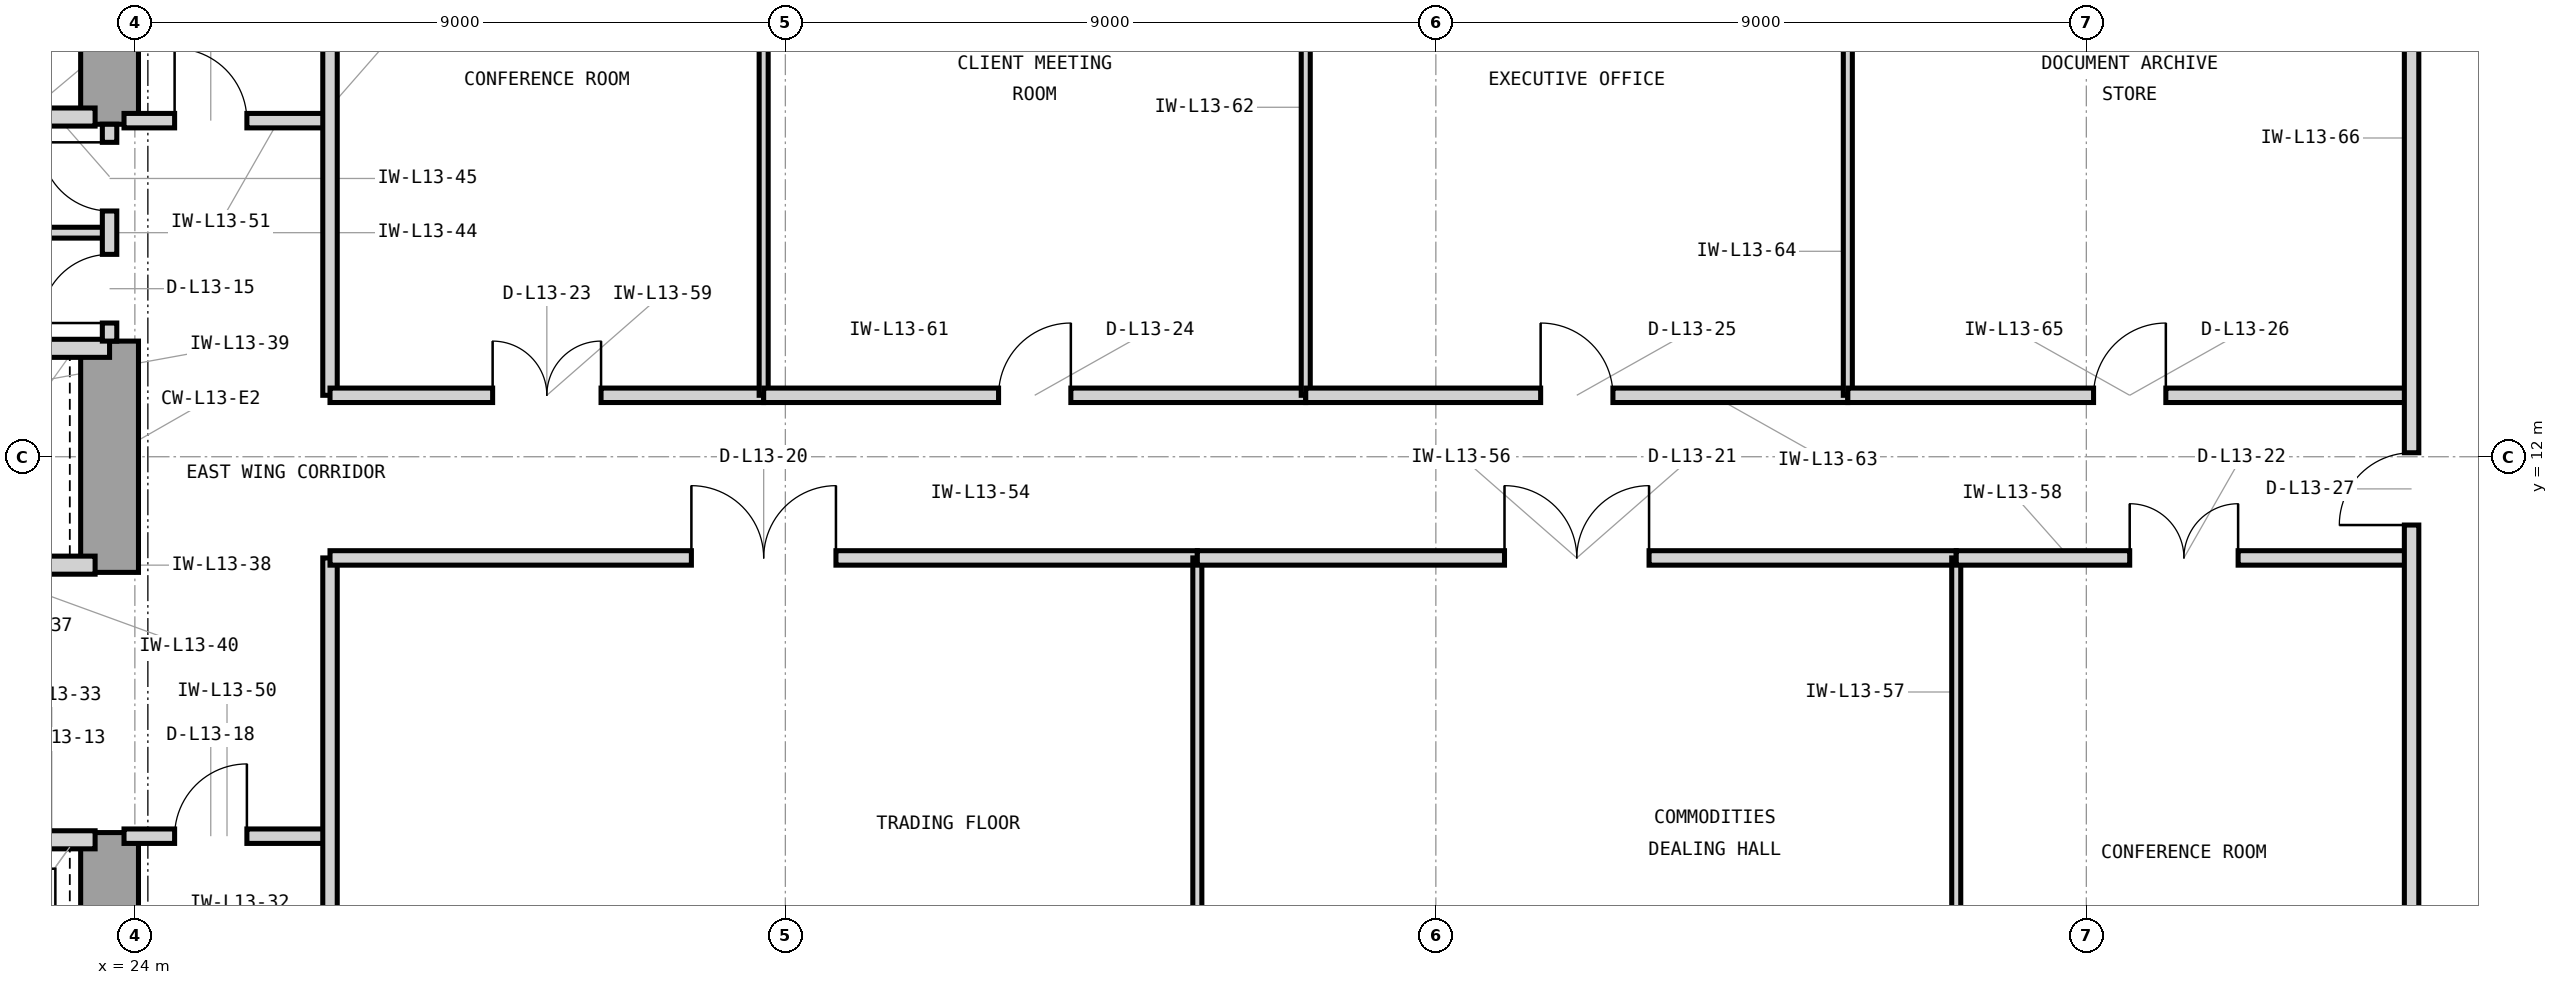
"""IFC4 building model, lengths in metres.
Left out: names, types, materials, properties, quantities, classifications, styles, units other than length and angle.
Written with IfcOpenShell. Run it as: python <this file> out.ifc"""

import sys

from ifc_helpers import new_model, si_unit, direction, frame, frame_2d, origin, place, context, subcontext, project, spatial, rectangle, extrude, element, fill, save


model = new_model("IFC4")
c1 = context("Model", 3, precision=1e-05, world=origin(), true_north=direction((0.0, 1.0)))
c2 = subcontext(c1, "Body", "Model", "MODEL_VIEW")
j1 = project(units=[si_unit("LENGTHUNIT", "METRE"), si_unit("PLANEANGLEUNIT", "RADIAN")], contexts=[c1])
p1 = place(None, origin())
s1 = spatial("IfcSite", under=j1, at=p1, CompositionType="ELEMENT")
p2 = place(p1, origin())
s2 = spatial("IfcBuilding", under=s1, at=p2, CompositionType="ELEMENT")
p3 = place(p2, frame((0.0, 0.0, 59.4)))
s3 = spatial("IfcBuildingStorey", under=s2, at=p3, CompositionType="ELEMENT", Elevation=59.4)
p4 = place(p3, frame((23.65, 3.75, 0.0), z_axis=(0.0, 0.0, 1.0), x_axis=(0.0, 1.0, 0.0)))
e1 = element("IfcWall", 1, at=p4, inside=s3, PredefinedType="SHEAR", context=c2, shape_type="SweptSolid", body=[
    extrude(rectangle(XDim=3.05, YDim=0.8, at=frame_2d((1.525, 0.0))), origin(), (0.0, 0.0, 1.0), 4.2),
])
p5 = place(p3, frame((23.65, 10.4, 0.0), z_axis=(0.0, 0.0, 1.0), x_axis=(0.0, 1.0, 0.0)))
e2 = element("IfcWall", 2, at=p5, inside=s3, PredefinedType="SHEAR", context=c2, shape_type="SweptSolid", body=[
    extrude(rectangle(XDim=3.2, YDim=0.8, at=frame_2d((1.6, 0.0))), origin(), (0.0, 0.0, 1.0), 4.2),
])
p6 = place(p3, frame((23.65, 16.6, 0.0), z_axis=(0.0, 0.0, 1.0), x_axis=(0.0, 1.0, 0.0)))
e3 = element("IfcWall", 3, at=p6, inside=s3, PredefinedType="SHEAR", context=c2, shape_type="SweptSolid", body=[
    extrude(rectangle(XDim=4.05, YDim=0.8, at=frame_2d((2.025, 0.0))), origin(), (0.0, 0.0, 1.0), 4.2),
])
p7 = place(p3, frame((21.05, 16.7, 0.0), z_axis=(0.0, 0.0, 1.0), x_axis=(1.0, 0.0, 0.0)))
e4 = element("IfcWall", 4, at=p7, inside=s3, PredefinedType="PARTITIONING", context=c2, shape_type="SweptSolid", body=[
    extrude(rectangle(XDim=2.4, YDim=0.25, at=frame_2d((1.2, 0.0))), origin(), (0.0, 0.0, 1.0), 3.426),
])
p8 = place(p3, frame((21.05, 6.7, 0.0), z_axis=(0.0, 0.0, 1.0), x_axis=(1.0, 0.0, 0.0)))
e5 = element("IfcWall", 5, at=p8, inside=s3, PredefinedType="PARTITIONING", context=c2, shape_type="SweptSolid", body=[
    extrude(rectangle(XDim=2.4, YDim=0.25, at=frame_2d((1.2, 0.0))), origin(), (0.0, 0.0, 1.0), 3.426),
])
p9 = place(p8, frame((0.48, 0.0, 0.0)))
e6 = element("IfcOpeningElement", 6, at=p9, cuts=e5, PredefinedType="OPENING", context=c2, shape_type="SweptSolid", body=[
    extrude(rectangle(XDim=1.15, YDim=2.25, at=frame_2d((0.575, 1.125))), frame((0.0, 0.135, 0.0), z_axis=(0.0, -1.0, 0.0), x_axis=(1.0, 0.0, 0.0)), (0.0, 0.0, 1.0), 0.27),
])
p10 = place(p3, frame((21.05, 10.5, 0.0), z_axis=(0.0, 0.0, 1.0), x_axis=(1.0, 0.0, 0.0)))
e7 = element("IfcWall", 7, at=p10, inside=s3, PredefinedType="PARTITIONING", context=c2, shape_type="SweptSolid", body=[
    extrude(rectangle(XDim=2.4, YDim=0.25, at=frame_2d((1.2, 0.0))), origin(), (0.0, 0.0, 1.0), 3.426),
])
p11 = place(p3, frame((14.7, 13.5, 0.0), z_axis=(0.0, 0.0, 1.0), x_axis=(1.0, 0.0, 0.0)))
e8 = element("IfcWall", 8, at=p11, inside=s3, PredefinedType="PARTITIONING", context=c2, shape_type="SweptSolid", body=[
    extrude(rectangle(XDim=8.95, YDim=0.25, at=frame_2d((4.475, 0.0))), origin(), (0.0, 0.0, 1.0), 3.426),
])
p12 = place(p3, frame((19.65, 15.1, 0.0), z_axis=(0.0, 0.0, 1.0), x_axis=(1.0, 0.0, 0.0)))
e9 = element("IfcWall", 9, at=p12, inside=s3, PredefinedType="PARTITIONING", context=c2, shape_type="SweptSolid", body=[
    extrude(rectangle(XDim=4.0, YDim=0.15, at=frame_2d((2.0, 0.0))), origin(), (0.0, 0.0, 1.0), 3.97),
])
p13 = place(p3, frame((23.65, 13.6, 0.0), z_axis=(0.0, 0.0, 1.0), x_axis=(0.0, 1.0, 0.0)))
e10 = element("IfcWall", 10, at=p13, inside=s3, PredefinedType="PARTITIONING", context=c2, shape_type="SweptSolid", body=[
    extrude(rectangle(XDim=3.0, YDim=0.2, at=frame_2d((1.5, 0.0))), origin(), (0.0, 0.0, 1.0), 3.97),
])
p14 = place(p13, frame((0.25, 0.0, 0.0)))
e11 = element("IfcOpeningElement", 11, at=p14, cuts=e10, PredefinedType="OPENING", context=c2, shape_type="SweptSolid", body=[
    extrude(rectangle(XDim=0.95, YDim=2.1, at=frame_2d((0.475, 1.05))), frame((0.0, 0.11, 0.0), z_axis=(0.0, -1.0, 0.0), x_axis=(1.0, 0.0, 0.0)), (0.0, 0.0, 1.0), 0.22),
])
p15 = place(p13, frame((1.8, 0.0, 0.0)))
e12 = element("IfcOpeningElement", 12, at=p15, cuts=e10, PredefinedType="OPENING", context=c2, shape_type="SweptSolid", body=[
    extrude(rectangle(XDim=0.95, YDim=2.1, at=frame_2d((0.475, 1.05))), frame((0.0, 0.11, 0.0), z_axis=(0.0, -1.0, 0.0), x_axis=(1.0, 0.0, 0.0)), (0.0, 0.0, 1.0), 0.22),
])
p16 = place(p3, frame((23.85, 6.75, 0.0), z_axis=(0.0, 0.0, 1.0), x_axis=(1.0, 0.0, 0.0)))
e13 = element("IfcWall", 13, at=p16, inside=s3, PredefinedType="PARTITIONING", context=c2, shape_type="SweptSolid", body=[
    extrude(rectangle(XDim=2.85, YDim=0.2, at=frame_2d((1.425, 0.0))), origin(), (0.0, 0.0, 1.0), 3.97),
])
p17 = place(p16, frame((0.7, 0.0, 0.0)))
e14 = element("IfcOpeningElement", 14, at=p17, cuts=e13, PredefinedType="OPENING", context=c2, shape_type="SweptSolid", body=[
    extrude(rectangle(XDim=1.0, YDim=2.15, at=frame_2d((0.5, 1.075))), frame((0.0, 0.11, 0.0), z_axis=(0.0, -1.0, 0.0), x_axis=(1.0, 0.0, 0.0)), (0.0, 0.0, 1.0), 0.22),
])
p18 = place(p3, frame((23.85, 16.65, 0.0), z_axis=(0.0, 0.0, 1.0), x_axis=(1.0, 0.0, 0.0)))
e15 = element("IfcWall", 15, at=p18, inside=s3, PredefinedType="PARTITIONING", context=c2, shape_type="SweptSolid", body=[
    extrude(rectangle(XDim=2.85, YDim=0.2, at=frame_2d((1.425, 0.0))), origin(), (0.0, 0.0, 1.0), 3.97),
])
p19 = place(p18, frame((0.7, 0.0, 0.0)))
e16 = element("IfcOpeningElement", 16, at=p19, cuts=e15, PredefinedType="OPENING", context=c2, shape_type="SweptSolid", body=[
    extrude(rectangle(XDim=1.0, YDim=2.15, at=frame_2d((0.5, 1.075))), frame((0.0, 0.11, 0.0), z_axis=(0.0, -1.0, 0.0), x_axis=(1.0, 0.0, 0.0)), (0.0, 0.0, 1.0), 0.22),
])
p20 = place(p3, frame((26.7, 3.18, 0.0), z_axis=(0.0, 0.0, 1.0), x_axis=(0.0, 1.0, 0.0)))
e17 = element("IfcWall", 17, at=p20, inside=s3, PredefinedType="PARTITIONING", context=c2, shape_type="SweptSolid", body=[
    extrude(rectangle(XDim=7.42, YDim=0.2, at=frame_2d((3.71, 0.0))), origin(), (0.0, 0.0, 1.0), 3.97),
])
p21 = place(p3, frame((26.7, 12.85, 0.0), z_axis=(0.0, 0.0, 1.0), x_axis=(0.0, 1.0, 0.0)))
e18 = element("IfcWall", 18, at=p21, inside=s3, PredefinedType="PARTITIONING", context=c2, shape_type="SweptSolid", body=[
    extrude(rectangle(XDim=7.97, YDim=0.2, at=frame_2d((3.985, 0.0))), origin(), (0.0, 0.0, 1.0), 3.97),
])
p22 = place(p3, frame((26.7, 10.6, 0.0), z_axis=(0.0, 0.0, 1.0), x_axis=(1.0, 0.0, 0.0)))
e19 = element("IfcWall", 19, at=p22, inside=s3, PredefinedType="PARTITIONING", context=c2, shape_type="SweptSolid", body=[
    extrude(rectangle(XDim=12.0, YDim=0.2, at=frame_2d((6.0, 0.0))), origin(), (0.0, 0.0, 1.0), 3.97),
])
p23 = place(p22, frame((5.0, 0.0, 0.0)))
e20 = element("IfcOpeningElement", 20, at=p23, cuts=e19, PredefinedType="OPENING", context=c2, shape_type="SweptSolid", body=[
    extrude(rectangle(XDim=2.0, YDim=2.5, at=frame_2d((1.0, 1.25))), frame((0.0, 0.11, 0.0), z_axis=(0.0, -1.0, 0.0), x_axis=(1.0, 0.0, 0.0)), (0.0, 0.0, 1.0), 0.22),
])
p24 = place(p3, frame((38.7, 3.18, 0.0), z_axis=(0.0, 0.0, 1.0), x_axis=(0.0, 1.0, 0.0)))
e21 = element("IfcWall", 21, at=p24, inside=s3, PredefinedType="PARTITIONING", context=c2, shape_type="SweptSolid", body=[
    extrude(rectangle(XDim=7.42, YDim=0.125, at=frame_2d((3.71, 0.0))), origin(), (0.0, 0.0, 1.0), 3.97),
])
p25 = place(p3, frame((38.7, 10.6, 0.0), z_axis=(0.0, 0.0, 1.0), x_axis=(1.0, 0.0, 0.0)))
e22 = element("IfcWall", 22, at=p25, inside=s3, PredefinedType="PARTITIONING", context=c2, shape_type="SweptSolid", body=[
    extrude(rectangle(XDim=10.5, YDim=0.2, at=frame_2d((5.25, 0.0))), origin(), (0.0, 0.0, 1.0), 3.97),
])
p26 = place(p25, frame((4.25, 0.0, 0.0)))
e23 = element("IfcOpeningElement", 23, at=p26, cuts=e22, PredefinedType="OPENING", context=c2, shape_type="SweptSolid", body=[
    extrude(rectangle(XDim=2.0, YDim=2.5, at=frame_2d((1.0, 1.25))), frame((0.0, 0.11, 0.0), z_axis=(0.0, -1.0, 0.0), x_axis=(1.0, 0.0, 0.0)), (0.0, 0.0, 1.0), 0.22),
])
p27 = place(p3, frame((49.2, 3.18, 0.0), z_axis=(0.0, 0.0, 1.0), x_axis=(0.0, 1.0, 0.0)))
e24 = element("IfcWall", 24, at=p27, inside=s3, PredefinedType="PARTITIONING", context=c2, shape_type="SweptSolid", body=[
    extrude(rectangle(XDim=7.42, YDim=0.125, at=frame_2d((3.71, 0.0))), origin(), (0.0, 0.0, 1.0), 3.97),
])
p28 = place(p3, frame((49.2, 10.6, 0.0), z_axis=(0.0, 0.0, 1.0), x_axis=(1.0, 0.0, 0.0)))
e25 = element("IfcWall", 25, at=p28, inside=s3, PredefinedType="PARTITIONING", context=c2, shape_type="SweptSolid", body=[
    extrude(rectangle(XDim=6.3, YDim=0.2, at=frame_2d((3.15, 0.0))), origin(), (0.0, 0.0, 1.0), 3.97),
])
p29 = place(p28, frame((2.4, 0.0, 0.0)))
e26 = element("IfcOpeningElement", 26, at=p29, cuts=e25, PredefinedType="OPENING", context=c2, shape_type="SweptSolid", body=[
    extrude(rectangle(XDim=1.5, YDim=2.3, at=frame_2d((0.75, 1.15))), frame((0.0, 0.11, 0.0), z_axis=(0.0, -1.0, 0.0), x_axis=(1.0, 0.0, 0.0)), (0.0, 0.0, 1.0), 0.22),
])
p30 = place(p3, frame((26.7, 12.85, 0.0), z_axis=(0.0, 0.0, 1.0), x_axis=(1.0, 0.0, 0.0)))
e27 = element("IfcWall", 27, at=p30, inside=s3, PredefinedType="PARTITIONING", context=c2, shape_type="SweptSolid", body=[
    extrude(rectangle(XDim=6.0, YDim=0.2, at=frame_2d((3.0, 0.0))), origin(), (0.0, 0.0, 1.0), 3.97),
])
p31 = place(p30, frame((2.25, 0.0, 0.0)))
e28 = element("IfcOpeningElement", 28, at=p31, cuts=e27, PredefinedType="OPENING", context=c2, shape_type="SweptSolid", body=[
    extrude(rectangle(XDim=1.5, YDim=2.3, at=frame_2d((0.75, 1.15))), frame((0.0, 0.11, 0.0), z_axis=(0.0, -1.0, 0.0), x_axis=(1.0, 0.0, 0.0)), (0.0, 0.0, 1.0), 0.22),
])
p32 = place(p3, frame((32.7, 12.85, 0.0), z_axis=(0.0, 0.0, 1.0), x_axis=(0.0, 1.0, 0.0)))
e29 = element("IfcWall", 29, at=p32, inside=s3, PredefinedType="PARTITIONING", context=c2, shape_type="SweptSolid", body=[
    extrude(rectangle(XDim=7.97, YDim=0.125, at=frame_2d((3.985, 0.0))), origin(), (0.0, 0.0, 1.0), 3.97),
])
p33 = place(p3, frame((32.7, 12.85, 0.0), z_axis=(0.0, 0.0, 1.0), x_axis=(1.0, 0.0, 0.0)))
e30 = element("IfcWall", 30, at=p33, inside=s3, PredefinedType="PARTITIONING", context=c2, shape_type="SweptSolid", body=[
    extrude(rectangle(XDim=7.5, YDim=0.2, at=frame_2d((3.75, 0.0))), origin(), (0.0, 0.0, 1.0), 3.97),
])
p34 = place(p33, frame((3.25, 0.0, 0.0)))
e31 = element("IfcOpeningElement", 31, at=p34, cuts=e30, PredefinedType="OPENING", context=c2, shape_type="SweptSolid", body=[
    extrude(rectangle(XDim=1.0, YDim=2.15, at=frame_2d((0.5, 1.075))), frame((0.0, 0.11, 0.0), z_axis=(0.0, -1.0, 0.0), x_axis=(1.0, 0.0, 0.0)), (0.0, 0.0, 1.0), 0.22),
])
p35 = place(p3, frame((40.2, 12.85, 0.0), z_axis=(0.0, 0.0, 1.0), x_axis=(0.0, 1.0, 0.0)))
e32 = element("IfcWall", 32, at=p35, inside=s3, PredefinedType="PARTITIONING", context=c2, shape_type="SweptSolid", body=[
    extrude(rectangle(XDim=7.97, YDim=0.125, at=frame_2d((3.985, 0.0))), origin(), (0.0, 0.0, 1.0), 3.97),
])
p36 = place(p3, frame((40.2, 12.85, 0.0), z_axis=(0.0, 0.0, 1.0), x_axis=(1.0, 0.0, 0.0)))
e33 = element("IfcWall", 33, at=p36, inside=s3, PredefinedType="PARTITIONING", context=c2, shape_type="SweptSolid", body=[
    extrude(rectangle(XDim=7.5, YDim=0.2, at=frame_2d((3.75, 0.0))), origin(), (0.0, 0.0, 1.0), 3.97),
])
p37 = place(p36, frame((3.25, 0.0, 0.0)))
e34 = element("IfcOpeningElement", 34, at=p37, cuts=e33, PredefinedType="OPENING", context=c2, shape_type="SweptSolid", body=[
    extrude(rectangle(XDim=1.0, YDim=2.15, at=frame_2d((0.5, 1.075))), frame((0.0, 0.11, 0.0), z_axis=(0.0, -1.0, 0.0), x_axis=(1.0, 0.0, 0.0)), (0.0, 0.0, 1.0), 0.22),
])
p38 = place(p3, frame((47.7, 12.85, 0.0), z_axis=(0.0, 0.0, 1.0), x_axis=(0.0, 1.0, 0.0)))
e35 = element("IfcWall", 35, at=p38, inside=s3, PredefinedType="PARTITIONING", context=c2, shape_type="SweptSolid", body=[
    extrude(rectangle(XDim=7.97, YDim=0.125, at=frame_2d((3.985, 0.0))), origin(), (0.0, 0.0, 1.0), 3.97),
])
p39 = place(p3, frame((47.7, 12.85, 0.0), z_axis=(0.0, 0.0, 1.0), x_axis=(1.0, 0.0, 0.0)))
e36 = element("IfcWall", 36, at=p39, inside=s3, PredefinedType="PARTITIONING", context=c2, shape_type="SweptSolid", body=[
    extrude(rectangle(XDim=7.8, YDim=0.2, at=frame_2d((3.9, 0.0))), origin(), (0.0, 0.0, 1.0), 3.97),
])
p40 = place(p39, frame((3.4, 0.0, 0.0)))
e37 = element("IfcOpeningElement", 37, at=p40, cuts=e36, PredefinedType="OPENING", context=c2, shape_type="SweptSolid", body=[
    extrude(rectangle(XDim=1.0, YDim=2.15, at=frame_2d((0.5, 1.075))), frame((0.0, 0.11, 0.0), z_axis=(0.0, -1.0, 0.0), x_axis=(1.0, 0.0, 0.0)), (0.0, 0.0, 1.0), 0.22),
])
p41 = place(p3, frame((55.5, 3.18, 0.0), z_axis=(0.0, 0.0, 1.0), x_axis=(0.0, 1.0, 0.0)))
e38 = element("IfcWall", 38, at=p41, inside=s3, PredefinedType="PARTITIONING", context=c2, shape_type="SweptSolid", body=[
    extrude(rectangle(XDim=17.64, YDim=0.2, at=frame_2d((8.82, 0.0))), origin(), (0.0, 0.0, 1.0), 3.97),
])
p42 = place(p41, frame((7.875, 0.0, 0.0)))
e39 = element("IfcOpeningElement", 39, at=p42, cuts=e38, PredefinedType="OPENING", context=c2, shape_type="SweptSolid", body=[
    extrude(rectangle(XDim=1.0, YDim=2.15, at=frame_2d((0.5, 1.075))), frame((0.0, 0.11, 0.0), z_axis=(0.0, -1.0, 0.0), x_axis=(1.0, 0.0, 0.0)), (0.0, 0.0, 1.0), 0.22),
])
p43 = place(p14, origin())
e40 = element("IfcDoor", 40, at=p43, inside=s3, OperationType="SINGLE_SWING_LEFT", PredefinedType="DOOR", context=c2, shape_type="SweptSolid", body=[
    extrude(rectangle(XDim=0.95, YDim=2.1, at=frame_2d((0.475, 1.05))), frame((0.0, 0.025, 0.0), z_axis=(0.0, -1.0, 0.0), x_axis=(1.0, 0.0, 0.0)), (0.0, 0.0, 1.0), 0.05),
])
fill(e11, e40)
p44 = place(p15, origin())
e41 = element("IfcDoor", 41, at=p44, inside=s3, OperationType="SINGLE_SWING_RIGHT", PredefinedType="DOOR", context=c2, shape_type="SweptSolid", body=[
    extrude(rectangle(XDim=0.95, YDim=2.1, at=frame_2d((0.475, 1.05))), frame((0.0, 0.025, 0.0), z_axis=(0.0, -1.0, 0.0), x_axis=(1.0, 0.0, 0.0)), (0.0, 0.0, 1.0), 0.05),
])
fill(e12, e41)
p45 = place(p17, origin())
e42 = element("IfcDoor", 42, at=p45, inside=s3, OperationType="SINGLE_SWING_RIGHT", PredefinedType="DOOR", context=c2, shape_type="SweptSolid", body=[
    extrude(rectangle(XDim=1.0, YDim=2.15, at=frame_2d((0.5, 1.075))), frame((0.0, 0.025, 0.0), z_axis=(0.0, -1.0, 0.0), x_axis=(1.0, 0.0, 0.0)), (0.0, 0.0, 1.0), 0.05),
])
fill(e14, e42)
p46 = place(p19, origin())
e43 = element("IfcDoor", 43, at=p46, inside=s3, OperationType="SINGLE_SWING_LEFT", PredefinedType="DOOR", context=c2, shape_type="SweptSolid", body=[
    extrude(rectangle(XDim=1.0, YDim=2.15, at=frame_2d((0.5, 1.075))), frame((0.0, 0.025, 0.0), z_axis=(0.0, -1.0, 0.0), x_axis=(1.0, 0.0, 0.0)), (0.0, 0.0, 1.0), 0.05),
])
fill(e16, e43)
p47 = place(p23, origin())
e44 = element("IfcDoor", 44, at=p47, inside=s3, OperationType="DOUBLE_DOOR_SINGLE_SWING", PredefinedType="DOOR", context=c2, shape_type="SweptSolid", body=[
    extrude(rectangle(XDim=2.0, YDim=2.5, at=frame_2d((1.0, 1.25))), frame((0.0, 0.025, 0.0), z_axis=(0.0, -1.0, 0.0), x_axis=(1.0, 0.0, 0.0)), (0.0, 0.0, 1.0), 0.05),
])
fill(e20, e44)
p48 = place(p26, origin())
e45 = element("IfcDoor", 45, at=p48, inside=s3, OperationType="DOUBLE_DOOR_SINGLE_SWING", PredefinedType="DOOR", context=c2, shape_type="SweptSolid", body=[
    extrude(rectangle(XDim=2.0, YDim=2.5, at=frame_2d((1.0, 1.25))), frame((0.0, 0.025, 0.0), z_axis=(0.0, -1.0, 0.0), x_axis=(1.0, 0.0, 0.0)), (0.0, 0.0, 1.0), 0.05),
])
fill(e23, e45)
p49 = place(p29, origin())
e46 = element("IfcDoor", 46, at=p49, inside=s3, OperationType="DOUBLE_DOOR_SINGLE_SWING", PredefinedType="DOOR", context=c2, shape_type="SweptSolid", body=[
    extrude(rectangle(XDim=1.5, YDim=2.3, at=frame_2d((0.75, 1.15))), frame((0.0, 0.025, 0.0), z_axis=(0.0, -1.0, 0.0), x_axis=(1.0, 0.0, 0.0)), (0.0, 0.0, 1.0), 0.05),
])
fill(e26, e46)
p50 = place(p31, origin())
e47 = element("IfcDoor", 47, at=p50, inside=s3, OperationType="DOUBLE_DOOR_SINGLE_SWING", PredefinedType="DOOR", context=c2, shape_type="SweptSolid", body=[
    extrude(rectangle(XDim=1.5, YDim=2.3, at=frame_2d((0.75, 1.15))), frame((0.0, 0.025, 0.0), z_axis=(0.0, -1.0, 0.0), x_axis=(1.0, 0.0, 0.0)), (0.0, 0.0, 1.0), 0.05),
])
fill(e28, e47)
p51 = place(p34, origin())
e48 = element("IfcDoor", 48, at=p51, inside=s3, OperationType="SINGLE_SWING_RIGHT", PredefinedType="DOOR", context=c2, shape_type="SweptSolid", body=[
    extrude(rectangle(XDim=1.0, YDim=2.15, at=frame_2d((0.5, 1.075))), frame((0.0, 0.025, 0.0), z_axis=(0.0, -1.0, 0.0), x_axis=(1.0, 0.0, 0.0)), (0.0, 0.0, 1.0), 0.05),
])
fill(e31, e48)
p52 = place(p37, origin())
e49 = element("IfcDoor", 49, at=p52, inside=s3, OperationType="SINGLE_SWING_LEFT", PredefinedType="DOOR", context=c2, shape_type="SweptSolid", body=[
    extrude(rectangle(XDim=1.0, YDim=2.15, at=frame_2d((0.5, 1.075))), frame((0.0, 0.025, 0.0), z_axis=(0.0, -1.0, 0.0), x_axis=(1.0, 0.0, 0.0)), (0.0, 0.0, 1.0), 0.05),
])
fill(e34, e49)
p53 = place(p40, origin())
e50 = element("IfcDoor", 50, at=p53, inside=s3, OperationType="SINGLE_SWING_RIGHT", PredefinedType="DOOR", context=c2, shape_type="SweptSolid", body=[
    extrude(rectangle(XDim=1.0, YDim=2.15, at=frame_2d((0.5, 1.075))), frame((0.0, 0.025, 0.0), z_axis=(0.0, -1.0, 0.0), x_axis=(1.0, 0.0, 0.0)), (0.0, 0.0, 1.0), 0.05),
])
fill(e37, e50)
p54 = place(p42, origin())
e51 = element("IfcDoor", 51, at=p54, inside=s3, OperationType="SINGLE_SWING_LEFT", PredefinedType="DOOR", context=c2, shape_type="SweptSolid", body=[
    extrude(rectangle(XDim=1.0, YDim=2.15, at=frame_2d((0.5, 1.075))), frame((0.0, 0.025, 0.0), z_axis=(0.0, -1.0, 0.0), x_axis=(1.0, 0.0, 0.0)), (0.0, 0.0, 1.0), 0.05),
])
fill(e39, e51)
save(model, sys.argv[1])
